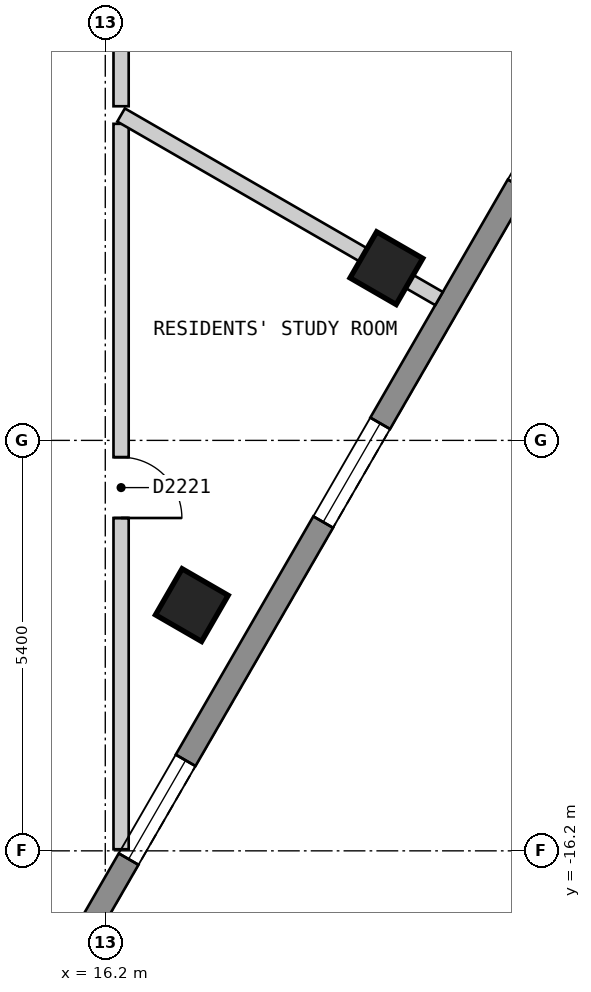
"""IFC4 building model, lengths in metres.
Left out: names, types, materials, properties, quantities, classifications, styles, units other than length and angle.
Written with IfcOpenShell. Run it as: python <this file> out.ifc"""

import sys

from ifc_helpers import new_model, si_unit, direction, frame, frame_2d, origin, origin_2d, place, context, subcontext, project, spatial, polyline, rectangle, outline, extrude, element, fill, save


model = new_model("IFC4")
c1 = context("Model", 3, precision=1e-05, world=origin(), true_north=direction((0.0, 1.0)))
c2 = subcontext(c1, "Body", "Model", "MODEL_VIEW")
j1 = project(units=[si_unit("LENGTHUNIT", "METRE"), si_unit("PLANEANGLEUNIT", "RADIAN")], contexts=[c1])
p1 = place(None, origin())
s1 = spatial("IfcSite", under=j1, at=p1, CompositionType="ELEMENT")
p2 = place(p1, origin())
s2 = spatial("IfcBuilding", under=s1, at=p2, CompositionType="ELEMENT")
p3 = place(p2, frame((0.0, 0.0, 229.8)))
s3 = spatial("IfcBuildingStorey", under=s2, at=p3, CompositionType="ELEMENT", Elevation=229.8)
for number, where, z_axis, x_axis in (
    (1, (17.339, -12.967, 0.0), (0.0, 0.0, 1.0), (0.5, 0.866, 0.0)),
    (2, (19.899, -8.534, 0.0), (0.0, 0.0, 1.0), (0.5, 0.866, 0.0)),
):
    element("IfcColumn", number, at=place(p3, frame(where, z_axis=z_axis, x_axis=x_axis)), inside=s3, PredefinedType="COLUMN", context=c2, shape_type="SweptSolid", body=[
        extrude(rectangle(XDim=0.7, YDim=0.7, at=origin_2d()), origin(), (0.0, 0.0, 1.0), 3.0),
    ])
p4 = place(p3, frame((15.285, -18.425, 0.0), z_axis=(0.0, 0.0, 1.0), x_axis=(0.500012653391, 0.866018098222, 0.0)))
e3 = element("IfcWall", 3, at=p4, inside=s3, PredefinedType="SOLIDWALL", context=c2, shape_type="SweptSolid", body=[
    extrude(outline(polyline([(0.0, -0.15), (16.628, -0.15), (16.548, 0.15), (0.08, 0.15), (0.0, -0.15)])), origin(), (0.0, 0.0, 1.0), 2.7),
])
p5 = place(p4, frame((2.444, 0.0, 0.15)))
e4 = element("IfcOpeningElement", 4, at=p5, cuts=e3, PredefinedType="OPENING", context=c2, shape_type="SweptSolid", body=[
    extrude(rectangle(XDim=1.5, YDim=2.1, at=frame_2d((0.75, 1.05))), frame((0.0, 0.16, 0.0), z_axis=(0.0, -1.0, 0.0), x_axis=(1.0, 0.0, 0.0)), (0.0, 0.0, 1.0), 0.32),
])
p6 = place(p4, frame((7.564, 0.0, 0.15)))
e5 = element("IfcOpeningElement", 5, at=p6, cuts=e3, PredefinedType="OPENING", context=c2, shape_type="SweptSolid", body=[
    extrude(rectangle(XDim=1.5, YDim=2.1, at=frame_2d((0.75, 1.05))), frame((0.0, 0.16, 0.0), z_axis=(0.0, -1.0, 0.0), x_axis=(1.0, 0.0, 0.0)), (0.0, 0.0, 1.0), 0.32),
])
p7 = place(p4, frame((12.682, 0.0, 0.15)))
e6 = element("IfcOpeningElement", 6, at=p7, cuts=e3, PredefinedType="OPENING", context=c2, shape_type="SweptSolid", body=[
    extrude(rectangle(XDim=1.5, YDim=2.1, at=frame_2d((0.75, 1.05))), frame((0.0, 0.16, 0.0), z_axis=(0.0, -1.0, 0.0), x_axis=(1.0, 0.0, 0.0)), (0.0, 0.0, 1.0), 0.32),
])
p8 = place(p3, frame((16.408, -2.4, 0.0), z_axis=(0.0, 0.0, 1.0), x_axis=(0.0, -1.0, 0.0)))
e7 = element("IfcWall", 7, at=p8, inside=s3, PredefinedType="PARTITIONING", context=c2, shape_type="SweptSolid", body=[
    extrude(rectangle(XDim=4.004, YDim=0.2, at=frame_2d((2.002, 0.0))), origin(), (0.0, 0.0, 1.0), 2.7),
])
p9 = place(p3, frame((16.408, -16.179, 0.0), z_axis=(0.0, 0.0, 1.0), x_axis=(0.0, 1.0, 0.0)))
e8 = element("IfcWall", 8, at=p9, inside=s3, PredefinedType="PARTITIONING", context=c2, shape_type="SweptSolid", body=[
    extrude(rectangle(XDim=9.544, YDim=0.2, at=frame_2d((4.772, 0.0))), origin(), (0.0, 0.0, 1.0), 2.7),
])
p10 = place(p9, frame((4.358, 0.0, 0.0)))
e9 = element("IfcOpeningElement", 9, at=p10, cuts=e8, PredefinedType="OPENING", context=c2, shape_type="SweptSolid", body=[
    extrude(rectangle(XDim=0.8, YDim=2.1, at=frame_2d((0.4, 1.05))), frame((0.0, 0.11, 0.0), z_axis=(0.0, -1.0, 0.0), x_axis=(1.0, 0.0, 0.0)), (0.0, 0.0, 1.0), 0.22),
])
p11 = place(p3, frame((16.408, -6.519, 0.0), z_axis=(0.0, 0.0, 1.0), x_axis=(0.866032396701, -0.499987887718, 0.0)))
e10 = element("IfcWall", 10, at=p11, inside=s3, PredefinedType="PARTITIONING", context=c2, shape_type="SweptSolid", body=[
    extrude(rectangle(XDim=4.83, YDim=0.2, at=frame_2d((2.415, 0.0))), origin(), (0.0, 0.0, 1.0), 2.7),
])
p12 = place(p5, origin())
e11 = element("IfcWindow", 11, at=p12, inside=s3, PartitioningType="SINGLE_PANEL", PredefinedType="WINDOW", context=c2, shape_type="SweptSolid", body=[
    extrude(rectangle(XDim=1.5, YDim=2.1, at=frame_2d((0.75, 1.05))), frame((0.0, 0.03, 0.0), z_axis=(0.0, -1.0, 0.0), x_axis=(1.0, 0.0, 0.0)), (0.0, 0.0, 1.0), 0.06),
])
fill(e4, e11)
p13 = place(p6, origin())
e12 = element("IfcWindow", 12, at=p13, inside=s3, PartitioningType="SINGLE_PANEL", PredefinedType="WINDOW", context=c2, shape_type="SweptSolid", body=[
    extrude(rectangle(XDim=1.5, YDim=2.1, at=frame_2d((0.75, 1.05))), frame((0.0, 0.03, 0.0), z_axis=(0.0, -1.0, 0.0), x_axis=(1.0, 0.0, 0.0)), (0.0, 0.0, 1.0), 0.06),
])
fill(e5, e12)
p14 = place(p10, origin())
e13 = element("IfcDoor", 13, at=p14, inside=s3, OperationType="SINGLE_SWING_LEFT", PredefinedType="DOOR", context=c2, shape_type="SweptSolid", body=[
    extrude(rectangle(XDim=0.8, YDim=2.1, at=frame_2d((0.4, 1.05))), frame((0.0, 0.025, 0.0), z_axis=(0.0, -1.0, 0.0), x_axis=(1.0, 0.0, 0.0)), (0.0, 0.0, 1.0), 0.05),
])
fill(e9, e13)
save(model, sys.argv[1])
